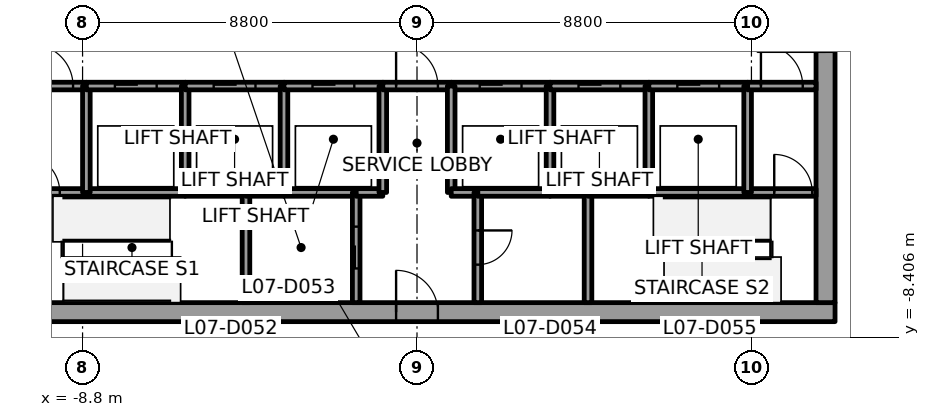
"""IFC4 building model, lengths in metres.
Left out: names, types, materials, properties, quantities, classifications, styles, units other than length and angle.
Written with IfcOpenShell. Run it as: python <this file> out.ifc"""

import sys

from ifc_helpers import new_model, si_unit, direction, frame, frame_2d, origin, place, context, subcontext, project, spatial, rectangle, extrude, element, fill, save


model = new_model("IFC4")
c1 = context("Model", 3, precision=1e-05, world=origin(), true_north=direction((0.0, 1.0)))
c2 = subcontext(c1, "Body", "Model", "MODEL_VIEW")
j1 = project(units=[si_unit("LENGTHUNIT", "METRE"), si_unit("PLANEANGLEUNIT", "RADIAN")], contexts=[c1])
p1 = place(None, origin())
s1 = spatial("IfcSite", under=j1, at=p1, CompositionType="ELEMENT")
p2 = place(p1, origin())
s2 = spatial("IfcBuilding", under=s1, at=p2, CompositionType="ELEMENT")
p3 = place(p2, frame((0.0, 0.0, 48.0)))
s3 = spatial("IfcBuildingStorey", under=s2, at=p3, CompositionType="ELEMENT", Elevation=48.0)
p4 = place(p3, frame((-11.0, -7.75, 0.0), z_axis=(0.0, 0.0, 1.0), x_axis=(1.0, 0.0, 0.0)))
e1 = element("IfcWall", 1, at=p4, inside=s3, PredefinedType="SHEAR", context=c2, shape_type="SweptSolid", body=[
    extrude(rectangle(XDim=22.0, YDim=0.5, at=frame_2d((11.0, 0.0))), origin(), (0.0, 0.0, 1.0), 3.7),
])
p5 = place(p4, frame((10.45, 0.0, 0.0)))
e2 = element("IfcOpeningElement", 2, at=p5, cuts=e1, PredefinedType="OPENING", context=c2, shape_type="SweptSolid", body=[
    extrude(rectangle(XDim=1.1, YDim=2.1, at=frame_2d((0.55, 1.05))), frame((0.0, 0.25, 0.0), z_axis=(0.0, -1.0, 0.0), x_axis=(1.0, 0.0, 0.0)), (0.0, 0.0, 1.0), 0.5),
])
p6 = place(p3, frame((10.75, -7.5, 0.0), z_axis=(0.0, 0.0, 1.0), x_axis=(0.0, 1.0, 0.0)))
e3 = element("IfcWall", 3, at=p6, inside=s3, PredefinedType="SHEAR", context=c2, shape_type="SweptSolid", body=[
    extrude(rectangle(XDim=15.0, YDim=0.5, at=frame_2d((7.5, 0.0))), origin(), (0.0, 0.0, 1.0), 3.7),
])
p7 = place(p6, frame((6.6, 0.0, 0.0)))
e4 = element("IfcOpeningElement", 4, at=p7, cuts=e3, PredefinedType="OPENING", context=c2, shape_type="SweptSolid", body=[
    extrude(rectangle(XDim=1.8, YDim=2.1, at=frame_2d((0.9, 1.05))), frame((0.0, 0.25, 0.0), z_axis=(0.0, -1.0, 0.0), x_axis=(1.0, 0.0, 0.0)), (0.0, 0.0, 1.0), 0.5),
])
p8 = place(p3, frame((-10.5, -4.6, 0.0), z_axis=(0.0, 0.0, 1.0), x_axis=(1.0, 0.0, 0.0)))
e5 = element("IfcWall", 5, at=p8, inside=s3, PredefinedType="SOLIDWALL", context=c2, shape_type="SweptSolid", body=[
    extrude(rectangle(XDim=1.8, YDim=0.2, at=frame_2d((0.9, 0.0))), origin(), (0.0, 0.0, 1.0), 3.55),
])
p9 = place(p8, frame((0.1, 0.0, 0.0)))
e6 = element("IfcOpeningElement", 6, at=p9, cuts=e5, PredefinedType="OPENING", context=c2, shape_type="SweptSolid", body=[
    extrude(rectangle(XDim=1.0, YDim=2.1, at=frame_2d((0.5, 1.05))), frame((0.0, 0.1, 0.0), z_axis=(0.0, -1.0, 0.0), x_axis=(1.0, 0.0, 0.0)), (0.0, 0.0, 1.0), 0.2),
])
p10 = place(p3, frame((-10.5, -1.8, 0.0), z_axis=(0.0, 0.0, 1.0), x_axis=(1.0, 0.0, 0.0)))
e7 = element("IfcWall", 7, at=p10, inside=s3, PredefinedType="SOLIDWALL", context=c2, shape_type="SweptSolid", body=[
    extrude(rectangle(XDim=1.8, YDim=0.2, at=frame_2d((0.9, 0.0))), origin(), (0.0, 0.0, 1.0), 3.55),
])
p11 = place(p10, frame((0.35, 0.0, 0.0)))
e8 = element("IfcOpeningElement", 8, at=p11, cuts=e7, PredefinedType="OPENING", context=c2, shape_type="SweptSolid", body=[
    extrude(rectangle(XDim=1.1, YDim=2.1, at=frame_2d((0.55, 1.05))), frame((0.0, 0.1, 0.0), z_axis=(0.0, -1.0, 0.0), x_axis=(1.0, 0.0, 0.0)), (0.0, 0.0, 1.0), 0.2),
])
p12 = place(p3, frame((-8.7, -4.6, 0.0), z_axis=(0.0, 0.0, 1.0), x_axis=(1.0, 0.0, 0.0)))
e9 = element("IfcWall", 9, at=p12, inside=s3, PredefinedType="SOLIDWALL", context=c2, shape_type="SweptSolid", body=[
    extrude(rectangle(XDim=2.6, YDim=0.2, at=frame_2d((1.3, 0.0))), origin(), (0.0, 0.0, 1.0), 3.55),
])
p13 = place(p3, frame((-8.7, -4.6, 0.0), z_axis=(0.0, 0.0, 1.0), x_axis=(0.0, 1.0, 0.0)))
e10 = element("IfcWall", 10, at=p13, inside=s3, PredefinedType="SOLIDWALL", context=c2, shape_type="SweptSolid", body=[
    extrude(rectangle(XDim=2.8, YDim=0.2, at=frame_2d((1.4, 0.0))), origin(), (0.0, 0.0, 1.0), 3.55),
])
p14 = place(p3, frame((-8.7, -1.8, 0.0), z_axis=(0.0, 0.0, 1.0), x_axis=(1.0, 0.0, 0.0)))
e11 = element("IfcWall", 11, at=p14, inside=s3, PredefinedType="SOLIDWALL", context=c2, shape_type="SweptSolid", body=[
    extrude(rectangle(XDim=2.6, YDim=0.2, at=frame_2d((1.3, 0.0))), origin(), (0.0, 0.0, 1.0), 3.55),
])
p15 = place(p14, frame((0.75, 0.0, 0.0)))
e12 = element("IfcOpeningElement", 12, at=p15, cuts=e11, PredefinedType="OPENING", context=c2, shape_type="SweptSolid", body=[
    extrude(rectangle(XDim=1.1, YDim=2.1, at=frame_2d((0.55, 1.05))), frame((0.0, 0.1, 0.0), z_axis=(0.0, -1.0, 0.0), x_axis=(1.0, 0.0, 0.0)), (0.0, 0.0, 1.0), 0.2),
])
p16 = place(p3, frame((-6.1, -4.6, 0.0), z_axis=(0.0, 0.0, 1.0), x_axis=(1.0, 0.0, 0.0)))
e13 = element("IfcWall", 13, at=p16, inside=s3, PredefinedType="SOLIDWALL", context=c2, shape_type="SweptSolid", body=[
    extrude(rectangle(XDim=1.6, YDim=0.2, at=frame_2d((0.8, 0.0))), origin(), (0.0, 0.0, 1.0), 3.55),
])
p17 = place(p3, frame((-6.1, -4.6, 0.0), z_axis=(0.0, 0.0, 1.0), x_axis=(0.0, 1.0, 0.0)))
e14 = element("IfcWall", 14, at=p17, inside=s3, PredefinedType="SOLIDWALL", context=c2, shape_type="SweptSolid", body=[
    extrude(rectangle(XDim=2.8, YDim=0.2, at=frame_2d((1.4, 0.0))), origin(), (0.0, 0.0, 1.0), 3.55),
])
p18 = place(p3, frame((-6.1, -1.8, 0.0), z_axis=(0.0, 0.0, 1.0), x_axis=(1.0, 0.0, 0.0)))
e15 = element("IfcWall", 15, at=p18, inside=s3, PredefinedType="SOLIDWALL", context=c2, shape_type="SweptSolid", body=[
    extrude(rectangle(XDim=2.6, YDim=0.2, at=frame_2d((1.3, 0.0))), origin(), (0.0, 0.0, 1.0), 3.55),
])
p19 = place(p18, frame((0.75, 0.0, 0.0)))
e16 = element("IfcOpeningElement", 16, at=p19, cuts=e15, PredefinedType="OPENING", context=c2, shape_type="SweptSolid", body=[
    extrude(rectangle(XDim=1.1, YDim=2.1, at=frame_2d((0.55, 1.05))), frame((0.0, 0.1, 0.0), z_axis=(0.0, -1.0, 0.0), x_axis=(1.0, 0.0, 0.0)), (0.0, 0.0, 1.0), 0.2),
])
p20 = place(p3, frame((-4.5, -4.6, 0.0), z_axis=(0.0, 0.0, 1.0), x_axis=(0.0, -1.0, 0.0)))
e17 = element("IfcWall", 17, at=p20, inside=s3, PredefinedType="SOLIDWALL", context=c2, shape_type="SweptSolid", body=[
    extrude(rectangle(XDim=2.9, YDim=0.2, at=frame_2d((1.45, 0.0))), origin(), (0.0, 0.0, 1.0), 3.55),
])
p21 = place(p3, frame((-4.5, -4.6, 0.0), z_axis=(0.0, 0.0, 1.0), x_axis=(1.0, 0.0, 0.0)))
e18 = element("IfcWall", 18, at=p21, inside=s3, PredefinedType="SOLIDWALL", context=c2, shape_type="SweptSolid", body=[
    extrude(rectangle(XDim=1.0, YDim=0.2, at=frame_2d((0.5, 0.0))), origin(), (0.0, 0.0, 1.0), 3.55),
])
p22 = place(p3, frame((-3.5, -4.6, 0.0), z_axis=(0.0, 0.0, 1.0), x_axis=(1.0, 0.0, 0.0)))
e19 = element("IfcWall", 19, at=p22, inside=s3, PredefinedType="SOLIDWALL", context=c2, shape_type="SweptSolid", body=[
    extrude(rectangle(XDim=1.9, YDim=0.2, at=frame_2d((0.95, 0.0))), origin(), (0.0, 0.0, 1.0), 3.55),
])
p23 = place(p3, frame((-3.5, -4.6, 0.0), z_axis=(0.0, 0.0, 1.0), x_axis=(0.0, 1.0, 0.0)))
e20 = element("IfcWall", 20, at=p23, inside=s3, PredefinedType="SOLIDWALL", context=c2, shape_type="SweptSolid", body=[
    extrude(rectangle(XDim=2.8, YDim=0.2, at=frame_2d((1.4, 0.0))), origin(), (0.0, 0.0, 1.0), 3.55),
])
p24 = place(p3, frame((-3.5, -1.8, 0.0), z_axis=(0.0, 0.0, 1.0), x_axis=(1.0, 0.0, 0.0)))
e21 = element("IfcWall", 21, at=p24, inside=s3, PredefinedType="SOLIDWALL", context=c2, shape_type="SweptSolid", body=[
    extrude(rectangle(XDim=2.6, YDim=0.2, at=frame_2d((1.3, 0.0))), origin(), (0.0, 0.0, 1.0), 3.55),
])
p25 = place(p24, frame((0.75, 0.0, 0.0)))
e22 = element("IfcOpeningElement", 22, at=p25, cuts=e21, PredefinedType="OPENING", context=c2, shape_type="SweptSolid", body=[
    extrude(rectangle(XDim=1.1, YDim=2.1, at=frame_2d((0.55, 1.05))), frame((0.0, 0.1, 0.0), z_axis=(0.0, -1.0, 0.0), x_axis=(1.0, 0.0, 0.0)), (0.0, 0.0, 1.0), 0.2),
])
p26 = place(p3, frame((-1.6, -7.5, 0.0), z_axis=(0.0, 0.0, 1.0), x_axis=(0.0, 1.0, 0.0)))
e23 = element("IfcWall", 23, at=p26, inside=s3, PredefinedType="SOLIDWALL", context=c2, shape_type="SweptSolid", body=[
    extrude(rectangle(XDim=2.9, YDim=0.2, at=frame_2d((1.45, 0.0))), origin(), (0.0, 0.0, 1.0), 3.55),
])
p27 = place(p26, frame((0.9, 0.0, 0.0)))
e24 = element("IfcOpeningElement", 24, at=p27, cuts=e23, PredefinedType="OPENING", context=c2, shape_type="SweptSolid", body=[
    extrude(rectangle(XDim=1.1, YDim=2.1, at=frame_2d((0.55, 1.05))), frame((0.0, 0.1, 0.0), z_axis=(0.0, -1.0, 0.0), x_axis=(1.0, 0.0, 0.0)), (0.0, 0.0, 1.0), 0.2),
])
p28 = place(p3, frame((-1.6, -4.6, 0.0), z_axis=(0.0, 0.0, 1.0), x_axis=(1.0, 0.0, 0.0)))
e25 = element("IfcWall", 25, at=p28, inside=s3, PredefinedType="SOLIDWALL", context=c2, shape_type="SweptSolid", body=[
    extrude(rectangle(XDim=0.7, YDim=0.2, at=frame_2d((0.35, 0.0))), origin(), (0.0, 0.0, 1.0), 3.55),
])
p29 = place(p3, frame((-0.9, -4.6, 0.0), z_axis=(0.0, 0.0, 1.0), x_axis=(0.0, 1.0, 0.0)))
e26 = element("IfcWall", 26, at=p29, inside=s3, PredefinedType="SOLIDWALL", context=c2, shape_type="SweptSolid", body=[
    extrude(rectangle(XDim=2.8, YDim=0.2, at=frame_2d((1.4, 0.0))), origin(), (0.0, 0.0, 1.0), 3.55),
])
p30 = place(p3, frame((-0.9, -1.8, 0.0), z_axis=(0.0, 0.0, 1.0), x_axis=(1.0, 0.0, 0.0)))
e27 = element("IfcWall", 27, at=p30, inside=s3, PredefinedType="SOLIDWALL", context=c2, shape_type="SweptSolid", body=[
    extrude(rectangle(XDim=1.8, YDim=0.2, at=frame_2d((0.9, 0.0))), origin(), (0.0, 0.0, 1.0), 3.55),
])
p31 = place(p30, frame((0.35, 0.0, 0.0)))
e28 = element("IfcOpeningElement", 28, at=p31, cuts=e27, PredefinedType="OPENING", context=c2, shape_type="SweptSolid", body=[
    extrude(rectangle(XDim=1.1, YDim=2.1, at=frame_2d((0.55, 1.05))), frame((0.0, 0.1, 0.0), z_axis=(0.0, -1.0, 0.0), x_axis=(1.0, 0.0, 0.0)), (0.0, 0.0, 1.0), 0.2),
])
p32 = place(p3, frame((0.9, -1.8, 0.0), z_axis=(0.0, 0.0, 1.0), x_axis=(1.0, 0.0, 0.0)))
e29 = element("IfcWall", 29, at=p32, inside=s3, PredefinedType="SOLIDWALL", context=c2, shape_type="SweptSolid", body=[
    extrude(rectangle(XDim=2.6, YDim=0.2, at=frame_2d((1.3, 0.0))), origin(), (0.0, 0.0, 1.0), 3.55),
])
p33 = place(p32, frame((0.75, 0.0, 0.0)))
e30 = element("IfcOpeningElement", 30, at=p33, cuts=e29, PredefinedType="OPENING", context=c2, shape_type="SweptSolid", body=[
    extrude(rectangle(XDim=1.1, YDim=2.1, at=frame_2d((0.55, 1.05))), frame((0.0, 0.1, 0.0), z_axis=(0.0, -1.0, 0.0), x_axis=(1.0, 0.0, 0.0)), (0.0, 0.0, 1.0), 0.2),
])
p34 = place(p3, frame((0.9, -1.8, 0.0), z_axis=(0.0, 0.0, 1.0), x_axis=(0.0, -1.0, 0.0)))
e31 = element("IfcWall", 31, at=p34, inside=s3, PredefinedType="SOLIDWALL", context=c2, shape_type="SweptSolid", body=[
    extrude(rectangle(XDim=2.8, YDim=0.2, at=frame_2d((1.4, 0.0))), origin(), (0.0, 0.0, 1.0), 3.55),
])
p35 = place(p3, frame((0.9, -4.6, 0.0), z_axis=(0.0, 0.0, 1.0), x_axis=(1.0, 0.0, 0.0)))
e32 = element("IfcWall", 32, at=p35, inside=s3, PredefinedType="SOLIDWALL", context=c2, shape_type="SweptSolid", body=[
    extrude(rectangle(XDim=0.7, YDim=0.2, at=frame_2d((0.35, 0.0))), origin(), (0.0, 0.0, 1.0), 3.55),
])
p36 = place(p3, frame((1.6, -4.6, 0.0), z_axis=(0.0, 0.0, 1.0), x_axis=(0.0, -1.0, 0.0)))
e33 = element("IfcWall", 33, at=p36, inside=s3, PredefinedType="SOLIDWALL", context=c2, shape_type="SweptSolid", body=[
    extrude(rectangle(XDim=2.9, YDim=0.2, at=frame_2d((1.45, 0.0))), origin(), (0.0, 0.0, 1.0), 3.55),
])
p37 = place(p36, frame((1.0, 0.0, 0.0)))
e34 = element("IfcOpeningElement", 34, at=p37, cuts=e33, PredefinedType="OPENING", context=c2, shape_type="SweptSolid", body=[
    extrude(rectangle(XDim=0.9, YDim=2.1, at=frame_2d((0.45, 1.05))), frame((0.0, 0.1, 0.0), z_axis=(0.0, -1.0, 0.0), x_axis=(1.0, 0.0, 0.0)), (0.0, 0.0, 1.0), 0.2),
])
p38 = place(p3, frame((3.5, -4.6, 0.0), z_axis=(0.0, 0.0, 1.0), x_axis=(-1.0, 0.0, 0.0)))
e35 = element("IfcWall", 35, at=p38, inside=s3, PredefinedType="SOLIDWALL", context=c2, shape_type="SweptSolid", body=[
    extrude(rectangle(XDim=1.9, YDim=0.2, at=frame_2d((0.95, 0.0))), origin(), (0.0, 0.0, 1.0), 3.55),
])
p39 = place(p3, frame((4.5, -4.6, 0.0), z_axis=(0.0, 0.0, 1.0), x_axis=(-1.0, 0.0, 0.0)))
e36 = element("IfcWall", 36, at=p39, inside=s3, PredefinedType="SOLIDWALL", context=c2, shape_type="SweptSolid", body=[
    extrude(rectangle(XDim=1.0, YDim=0.2, at=frame_2d((0.5, 0.0))), origin(), (0.0, 0.0, 1.0), 3.55),
])
p40 = place(p3, frame((3.5, -4.6, 0.0), z_axis=(0.0, 0.0, 1.0), x_axis=(0.0, 1.0, 0.0)))
e37 = element("IfcWall", 37, at=p40, inside=s3, PredefinedType="SOLIDWALL", context=c2, shape_type="SweptSolid", body=[
    extrude(rectangle(XDim=2.8, YDim=0.2, at=frame_2d((1.4, 0.0))), origin(), (0.0, 0.0, 1.0), 3.55),
])
p41 = place(p3, frame((3.5, -1.8, 0.0), z_axis=(0.0, 0.0, 1.0), x_axis=(1.0, 0.0, 0.0)))
e38 = element("IfcWall", 38, at=p41, inside=s3, PredefinedType="SOLIDWALL", context=c2, shape_type="SweptSolid", body=[
    extrude(rectangle(XDim=2.6, YDim=0.2, at=frame_2d((1.3, 0.0))), origin(), (0.0, 0.0, 1.0), 3.55),
])
p42 = place(p41, frame((0.75, 0.0, 0.0)))
e39 = element("IfcOpeningElement", 39, at=p42, cuts=e38, PredefinedType="OPENING", context=c2, shape_type="SweptSolid", body=[
    extrude(rectangle(XDim=1.1, YDim=2.1, at=frame_2d((0.55, 1.05))), frame((0.0, 0.1, 0.0), z_axis=(0.0, -1.0, 0.0), x_axis=(1.0, 0.0, 0.0)), (0.0, 0.0, 1.0), 0.2),
])
p43 = place(p3, frame((4.5, -7.5, 0.0), z_axis=(0.0, 0.0, 1.0), x_axis=(0.0, 1.0, 0.0)))
e40 = element("IfcWall", 40, at=p43, inside=s3, PredefinedType="SOLIDWALL", context=c2, shape_type="SweptSolid", body=[
    extrude(rectangle(XDim=2.9, YDim=0.2, at=frame_2d((1.45, 0.0))), origin(), (0.0, 0.0, 1.0), 3.55),
])
p44 = place(p3, frame((4.5, -4.6, 0.0), z_axis=(0.0, 0.0, 1.0), x_axis=(1.0, 0.0, 0.0)))
e41 = element("IfcWall", 41, at=p44, inside=s3, PredefinedType="SOLIDWALL", context=c2, shape_type="SweptSolid", body=[
    extrude(rectangle(XDim=1.6, YDim=0.2, at=frame_2d((0.8, 0.0))), origin(), (0.0, 0.0, 1.0), 3.55),
])
p45 = place(p3, frame((6.1, -4.6, 0.0), z_axis=(0.0, 0.0, 1.0), x_axis=(1.0, 0.0, 0.0)))
e42 = element("IfcWall", 42, at=p45, inside=s3, PredefinedType="SOLIDWALL", context=c2, shape_type="SweptSolid", body=[
    extrude(rectangle(XDim=2.6, YDim=0.2, at=frame_2d((1.3, 0.0))), origin(), (0.0, 0.0, 1.0), 3.55),
])
p46 = place(p3, frame((6.1, -4.6, 0.0), z_axis=(0.0, 0.0, 1.0), x_axis=(0.0, 1.0, 0.0)))
e43 = element("IfcWall", 43, at=p46, inside=s3, PredefinedType="SOLIDWALL", context=c2, shape_type="SweptSolid", body=[
    extrude(rectangle(XDim=2.8, YDim=0.2, at=frame_2d((1.4, 0.0))), origin(), (0.0, 0.0, 1.0), 3.55),
])
p47 = place(p3, frame((6.1, -1.8, 0.0), z_axis=(0.0, 0.0, 1.0), x_axis=(1.0, 0.0, 0.0)))
e44 = element("IfcWall", 44, at=p47, inside=s3, PredefinedType="SOLIDWALL", context=c2, shape_type="SweptSolid", body=[
    extrude(rectangle(XDim=2.6, YDim=0.2, at=frame_2d((1.3, 0.0))), origin(), (0.0, 0.0, 1.0), 3.55),
])
p48 = place(p47, frame((0.75, 0.0, 0.0)))
e45 = element("IfcOpeningElement", 45, at=p48, cuts=e44, PredefinedType="OPENING", context=c2, shape_type="SweptSolid", body=[
    extrude(rectangle(XDim=1.1, YDim=2.1, at=frame_2d((0.55, 1.05))), frame((0.0, 0.1, 0.0), z_axis=(0.0, -1.0, 0.0), x_axis=(1.0, 0.0, 0.0)), (0.0, 0.0, 1.0), 0.2),
])
p49 = place(p3, frame((8.7, -4.6, 0.0), z_axis=(0.0, 0.0, 1.0), x_axis=(1.0, 0.0, 0.0)))
e46 = element("IfcWall", 46, at=p49, inside=s3, PredefinedType="SOLIDWALL", context=c2, shape_type="SweptSolid", body=[
    extrude(rectangle(XDim=1.8, YDim=0.2, at=frame_2d((0.9, 0.0))), origin(), (0.0, 0.0, 1.0), 3.55),
])
p50 = place(p49, frame((0.7, 0.0, 0.0)))
e47 = element("IfcOpeningElement", 47, at=p50, cuts=e46, PredefinedType="OPENING", context=c2, shape_type="SweptSolid", body=[
    extrude(rectangle(XDim=1.0, YDim=2.1, at=frame_2d((0.5, 1.05))), frame((0.0, 0.1, 0.0), z_axis=(0.0, -1.0, 0.0), x_axis=(1.0, 0.0, 0.0)), (0.0, 0.0, 1.0), 0.2),
])
p51 = place(p3, frame((8.7, -1.8, 0.0), z_axis=(0.0, 0.0, 1.0), x_axis=(0.0, -1.0, 0.0)))
e48 = element("IfcWall", 48, at=p51, inside=s3, PredefinedType="SOLIDWALL", context=c2, shape_type="SweptSolid", body=[
    extrude(rectangle(XDim=2.8, YDim=0.2, at=frame_2d((1.4, 0.0))), origin(), (0.0, 0.0, 1.0), 3.55),
])
p52 = place(p3, frame((8.7, -1.8, 0.0), z_axis=(0.0, 0.0, 1.0), x_axis=(1.0, 0.0, 0.0)))
e49 = element("IfcWall", 49, at=p52, inside=s3, PredefinedType="SOLIDWALL", context=c2, shape_type="SweptSolid", body=[
    extrude(rectangle(XDim=1.8, YDim=0.2, at=frame_2d((0.9, 0.0))), origin(), (0.0, 0.0, 1.0), 3.55),
])
p53 = place(p52, frame((0.35, 0.0, 0.0)))
e50 = element("IfcOpeningElement", 50, at=p53, cuts=e49, PredefinedType="OPENING", context=c2, shape_type="SweptSolid", body=[
    extrude(rectangle(XDim=1.1, YDim=2.1, at=frame_2d((0.55, 1.05))), frame((0.0, 0.1, 0.0), z_axis=(0.0, -1.0, 0.0), x_axis=(1.0, 0.0, 0.0)), (0.0, 0.0, 1.0), 0.2),
])
p54 = place(p15, origin())
e51 = element("IfcDoor", 51, at=p54, inside=s3, OperationType="SLIDING_TO_LEFT", PredefinedType="DOOR", context=c2, shape_type="SweptSolid", body=[
    extrude(rectangle(XDim=1.1, YDim=2.1, at=frame_2d((0.55, 1.05))), frame((0.0, 0.025, 0.0), z_axis=(0.0, -1.0, 0.0), x_axis=(1.0, 0.0, 0.0)), (0.0, 0.0, 1.0), 0.05),
])
fill(e12, e51)
p55 = place(p19, origin())
e52 = element("IfcDoor", 52, at=p55, inside=s3, OperationType="SLIDING_TO_RIGHT", PredefinedType="DOOR", context=c2, shape_type="SweptSolid", body=[
    extrude(rectangle(XDim=1.1, YDim=2.1, at=frame_2d((0.55, 1.05))), frame((0.0, 0.025, 0.0), z_axis=(0.0, -1.0, 0.0), x_axis=(1.0, 0.0, 0.0)), (0.0, 0.0, 1.0), 0.05),
])
fill(e16, e52)
p56 = place(p25, origin())
e53 = element("IfcDoor", 53, at=p56, inside=s3, OperationType="SLIDING_TO_LEFT", PredefinedType="DOOR", context=c2, shape_type="SweptSolid", body=[
    extrude(rectangle(XDim=1.1, YDim=2.1, at=frame_2d((0.55, 1.05))), frame((0.0, 0.025, 0.0), z_axis=(0.0, -1.0, 0.0), x_axis=(1.0, 0.0, 0.0)), (0.0, 0.0, 1.0), 0.05),
])
fill(e22, e53)
p57 = place(p33, origin())
e54 = element("IfcDoor", 54, at=p57, inside=s3, OperationType="SLIDING_TO_RIGHT", PredefinedType="DOOR", context=c2, shape_type="SweptSolid", body=[
    extrude(rectangle(XDim=1.1, YDim=2.1, at=frame_2d((0.55, 1.05))), frame((0.0, 0.025, 0.0), z_axis=(0.0, -1.0, 0.0), x_axis=(1.0, 0.0, 0.0)), (0.0, 0.0, 1.0), 0.05),
])
fill(e30, e54)
p58 = place(p42, origin())
e55 = element("IfcDoor", 55, at=p58, inside=s3, OperationType="SLIDING_TO_RIGHT", PredefinedType="DOOR", context=c2, shape_type="SweptSolid", body=[
    extrude(rectangle(XDim=1.1, YDim=2.1, at=frame_2d((0.55, 1.05))), frame((0.0, 0.025, 0.0), z_axis=(0.0, -1.0, 0.0), x_axis=(1.0, 0.0, 0.0)), (0.0, 0.0, 1.0), 0.05),
])
fill(e39, e55)
p59 = place(p48, origin())
e56 = element("IfcDoor", 56, at=p59, inside=s3, OperationType="SLIDING_TO_RIGHT", PredefinedType="DOOR", context=c2, shape_type="SweptSolid", body=[
    extrude(rectangle(XDim=1.1, YDim=2.1, at=frame_2d((0.55, 1.05))), frame((0.0, 0.025, 0.0), z_axis=(0.0, -1.0, 0.0), x_axis=(1.0, 0.0, 0.0)), (0.0, 0.0, 1.0), 0.05),
])
fill(e45, e56)
p60 = place(p27, origin())
e57 = element("IfcDoor", 57, at=p60, inside=s3, OperationType="SLIDING_TO_LEFT", PredefinedType="DOOR", context=c2, shape_type="SweptSolid", body=[
    extrude(rectangle(XDim=1.1, YDim=2.1, at=frame_2d((0.55, 1.05))), frame((0.0, 0.025, 0.0), z_axis=(0.0, -1.0, 0.0), x_axis=(1.0, 0.0, 0.0)), (0.0, 0.0, 1.0), 0.05),
])
fill(e24, e57)
p61 = place(p11, origin())
e58 = element("IfcDoor", 58, at=p61, inside=s3, OperationType="SINGLE_SWING_LEFT", PredefinedType="DOOR", context=c2, shape_type="SweptSolid", body=[
    extrude(rectangle(XDim=1.1, YDim=2.1, at=frame_2d((0.55, 1.05))), frame((0.0, 0.025, 0.0), z_axis=(0.0, -1.0, 0.0), x_axis=(1.0, 0.0, 0.0)), (0.0, 0.0, 1.0), 0.05),
])
fill(e8, e58)
p62 = place(p53, origin())
e59 = element("IfcDoor", 59, at=p62, inside=s3, OperationType="SINGLE_SWING_LEFT", PredefinedType="DOOR", context=c2, shape_type="SweptSolid", body=[
    extrude(rectangle(XDim=1.1, YDim=2.1, at=frame_2d((0.55, 1.05))), frame((0.0, 0.025, 0.0), z_axis=(0.0, -1.0, 0.0), x_axis=(1.0, 0.0, 0.0)), (0.0, 0.0, 1.0), 0.05),
])
fill(e50, e59)
p63 = place(p31, origin())
e60 = element("IfcDoor", 60, at=p63, inside=s3, OperationType="SINGLE_SWING_LEFT", PredefinedType="DOOR", context=c2, shape_type="SweptSolid", body=[
    extrude(rectangle(XDim=1.1, YDim=2.1, at=frame_2d((0.55, 1.05))), frame((0.0, 0.025, 0.0), z_axis=(0.0, -1.0, 0.0), x_axis=(1.0, 0.0, 0.0)), (0.0, 0.0, 1.0), 0.05),
])
fill(e28, e60)
p64 = place(p9, origin())
e61 = element("IfcDoor", 61, at=p64, inside=s3, OperationType="SINGLE_SWING_LEFT", PredefinedType="DOOR", context=c2, shape_type="SweptSolid", body=[
    extrude(rectangle(XDim=1.0, YDim=2.1, at=frame_2d((0.5, 1.05))), frame((0.0, 0.025, 0.0), z_axis=(0.0, -1.0, 0.0), x_axis=(1.0, 0.0, 0.0)), (0.0, 0.0, 1.0), 0.05),
])
fill(e6, e61)
p65 = place(p50, origin())
e62 = element("IfcDoor", 62, at=p65, inside=s3, OperationType="SINGLE_SWING_RIGHT", PredefinedType="DOOR", context=c2, shape_type="SweptSolid", body=[
    extrude(rectangle(XDim=1.0, YDim=2.1, at=frame_2d((0.5, 1.05))), frame((0.0, 0.025, 0.0), z_axis=(0.0, -1.0, 0.0), x_axis=(1.0, 0.0, 0.0)), (0.0, 0.0, 1.0), 0.05),
])
fill(e47, e62)
p66 = place(p37, origin())
e63 = element("IfcDoor", 63, at=p66, inside=s3, OperationType="SINGLE_SWING_RIGHT", PredefinedType="DOOR", context=c2, shape_type="SweptSolid", body=[
    extrude(rectangle(XDim=0.9, YDim=2.1, at=frame_2d((0.45, 1.05))), frame((0.0, 0.025, 0.0), z_axis=(0.0, -1.0, 0.0), x_axis=(1.0, 0.0, 0.0)), (0.0, 0.0, 1.0), 0.05),
])
fill(e34, e63)
p67 = place(p7, origin())
e64 = element("IfcDoor", 64, at=p67, inside=s3, OperationType="DOUBLE_DOOR_SINGLE_SWING", PredefinedType="DOOR", context=c2, shape_type="SweptSolid", body=[
    extrude(rectangle(XDim=1.8, YDim=2.1, at=frame_2d((0.9, 1.05))), frame((0.0, 0.025, 0.0), z_axis=(0.0, -1.0, 0.0), x_axis=(1.0, 0.0, 0.0)), (0.0, 0.0, 1.0), 0.05),
])
fill(e4, e64)
p68 = place(p5, origin())
e65 = element("IfcDoor", 65, at=p68, inside=s3, OperationType="SINGLE_SWING_RIGHT", PredefinedType="DOOR", context=c2, shape_type="SweptSolid", body=[
    extrude(rectangle(XDim=1.1, YDim=2.1, at=frame_2d((0.55, 1.05))), frame((0.0, 0.025, 0.0), z_axis=(0.0, -1.0, 0.0), x_axis=(1.0, 0.0, 0.0)), (0.0, 0.0, 1.0), 0.05),
])
fill(e2, e65)
save(model, sys.argv[1])
